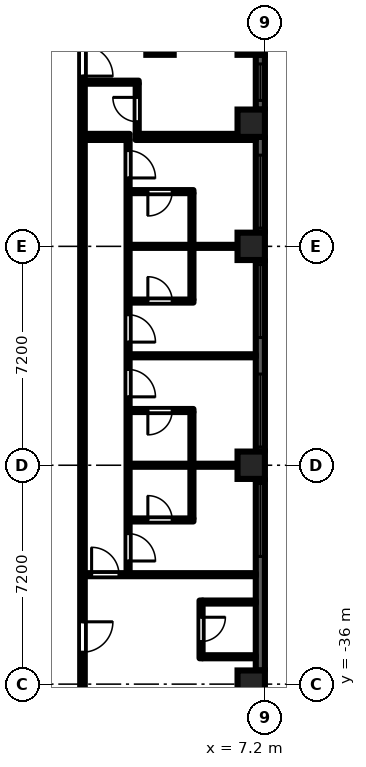
"""IFC4 building model, lengths in metres.
Left out: names, types, materials, properties, quantities, classifications, styles, units other than length and angle.
Written with IfcOpenShell. Run it as: python <this file> out.ifc"""

import sys

from ifc_helpers import new_model, si_unit, direction, frame, frame_2d, origin, origin_2d, place, context, subcontext, project, spatial, rectangle, extrude, element, fill, save


model = new_model("IFC4")
c1 = context("Model", 3, precision=1e-05, world=origin(), true_north=direction((0.0, 1.0)))
c2 = subcontext(c1, "Body", "Model", "MODEL_VIEW")
j1 = project(units=[si_unit("LENGTHUNIT", "METRE"), si_unit("PLANEANGLEUNIT", "RADIAN")], contexts=[c1])
p1 = place(None, origin())
s1 = spatial("IfcSite", under=j1, at=p1, CompositionType="ELEMENT")
p2 = place(p1, origin())
s2 = spatial("IfcBuilding", under=s1, at=p2, CompositionType="ELEMENT")
p3 = place(p2, frame((0.0, 0.0, 29.7)))
s3 = spatial("IfcBuildingStorey", under=s2, at=p3, CompositionType="ELEMENT", Elevation=29.7)
for number, where, z_axis, x_axis in (
    (1, (3.75, -14.85, 0.0), (0.0, 0.0, 1.0), (1.0, 0.0, 0.0)),
    (2, (6.75, -36.0, 0.0), (0.0, 0.0, 1.0), (1.0, 0.0, 0.0)),
    (3, (6.75, -28.8, 0.0), (0.0, 0.0, 1.0), (1.0, 0.0, 0.0)),
    (4, (6.75, -21.6, 0.0), (0.0, 0.0, 1.0), (1.0, 0.0, 0.0)),
    (5, (6.75, -17.55, 0.0), (0.0, 0.0, 1.0), (1.0, 0.0, 0.0)),
    (6, (6.75, -14.85, 0.0), (0.0, 0.0, 1.0), (1.0, 0.0, 0.0)),
):
    element("IfcColumn", number, at=place(p3, frame(where, z_axis=z_axis, x_axis=x_axis)), inside=s3, PredefinedType="COLUMN", context=c2, shape_type="SweptSolid", body=[
        extrude(rectangle(XDim=0.9, YDim=0.9, at=origin_2d()), origin(), (0.0, 0.0, 1.0), 3.0),
    ])
p4 = place(p3, frame((7.05, -35.55, 0.0), z_axis=(0.0, 0.0, 1.0), x_axis=(0.0, 1.0, 0.0)))
e7 = element("IfcWall", 7, at=p4, inside=s3, PredefinedType="SOLIDWALL", context=c2, shape_type="SweptSolid", body=[
    extrude(rectangle(XDim=6.3, YDim=0.3, at=frame_2d((3.15, 0.0))), origin(), (0.0, 0.0, 1.0), 2.1),
])
p5 = place(p4, frame((3.75, 0.0, 0.2)))
e8 = element("IfcOpeningElement", 8, at=p5, cuts=e7, PredefinedType="OPENING", context=c2, shape_type="SweptSolid", body=[
    extrude(rectangle(XDim=2.4, YDim=1.85, at=frame_2d((1.2, 0.925))), frame((0.0, 0.16, 0.0), z_axis=(0.0, -1.0, 0.0), x_axis=(1.0, 0.0, 0.0)), (0.0, 0.0, 1.0), 0.32),
])
p6 = place(p3, frame((7.05, -28.35, 0.0), z_axis=(0.0, 0.0, 1.0), x_axis=(0.0, 1.0, 0.0)))
e9 = element("IfcWall", 9, at=p6, inside=s3, PredefinedType="SOLIDWALL", context=c2, shape_type="SweptSolid", body=[
    extrude(rectangle(XDim=6.3, YDim=0.3, at=frame_2d((3.15, 0.0))), origin(), (0.0, 0.0, 1.0), 2.1),
])
p7 = place(p6, frame((0.15, 0.0, 0.2)))
e10 = element("IfcOpeningElement", 10, at=p7, cuts=e9, PredefinedType="OPENING", context=c2, shape_type="SweptSolid", body=[
    extrude(rectangle(XDim=2.4, YDim=1.85, at=frame_2d((1.2, 0.925))), frame((0.0, 0.16, 0.0), z_axis=(0.0, -1.0, 0.0), x_axis=(1.0, 0.0, 0.0)), (0.0, 0.0, 1.0), 0.32),
])
p8 = place(p6, frame((3.75, 0.0, 0.2)))
e11 = element("IfcOpeningElement", 11, at=p8, cuts=e9, PredefinedType="OPENING", context=c2, shape_type="SweptSolid", body=[
    extrude(rectangle(XDim=2.4, YDim=1.85, at=frame_2d((1.2, 0.925))), frame((0.0, 0.16, 0.0), z_axis=(0.0, -1.0, 0.0), x_axis=(1.0, 0.0, 0.0)), (0.0, 0.0, 1.0), 0.32),
])
p9 = place(p3, frame((7.05, -21.15, 0.0), z_axis=(0.0, 0.0, 1.0), x_axis=(0.0, 1.0, 0.0)))
e12 = element("IfcWall", 12, at=p9, inside=s3, PredefinedType="SOLIDWALL", context=c2, shape_type="SweptSolid", body=[
    extrude(rectangle(XDim=3.15, YDim=0.3, at=frame_2d((1.575, 0.0))), origin(), (0.0, 0.0, 1.0), 2.1),
])
p10 = place(p9, frame((0.15, 0.0, 0.2)))
e13 = element("IfcOpeningElement", 13, at=p10, cuts=e12, PredefinedType="OPENING", context=c2, shape_type="SweptSolid", body=[
    extrude(rectangle(XDim=2.4, YDim=1.85, at=frame_2d((1.2, 0.925))), frame((0.0, 0.16, 0.0), z_axis=(0.0, -1.0, 0.0), x_axis=(1.0, 0.0, 0.0)), (0.0, 0.0, 1.0), 0.32),
])
p11 = place(p3, frame((7.05, -17.1, 0.0), z_axis=(0.0, 0.0, 1.0), x_axis=(0.0, 1.0, 0.0)))
e14 = element("IfcWall", 14, at=p11, inside=s3, PredefinedType="SOLIDWALL", context=c2, shape_type="SweptSolid", body=[
    extrude(rectangle(XDim=1.8, YDim=0.3, at=frame_2d((0.9, 0.0))), origin(), (0.0, 0.0, 1.0), 2.1),
])
p12 = place(p11, frame((0.3, 0.0, 0.2)))
e15 = element("IfcOpeningElement", 15, at=p12, cuts=e14, PredefinedType="OPENING", context=c2, shape_type="SweptSolid", body=[
    extrude(rectangle(XDim=1.2, YDim=1.85, at=frame_2d((0.6, 0.925))), frame((0.0, 0.16, 0.0), z_axis=(0.0, -1.0, 0.0), x_axis=(1.0, 0.0, 0.0)), (0.0, 0.0, 1.0), 0.32),
])
p13 = place(p3, frame((1.2, -36.5, 0.0), z_axis=(0.0, 0.0, 1.0), x_axis=(0.0, 1.0, 0.0)))
e16 = element("IfcWall", 16, at=p13, inside=s3, PredefinedType="PARTITIONING", context=c2, shape_type="SweptSolid", body=[
    extrude(rectangle(XDim=35.375, YDim=0.15, at=frame_2d((17.688, 0.0))), origin(), (0.0, 0.0, 1.0), 2.575),
])
p14 = place(p13, frame((31.85, 0.0, 0.0)))
e17 = element("IfcOpeningElement", 17, at=p14, cuts=e16, PredefinedType="OPENING", context=c2, shape_type="SweptSolid", body=[
    extrude(rectangle(XDim=0.9, YDim=2.1, at=frame_2d((0.45, 1.05))), frame((0.0, 0.085, 0.0), z_axis=(0.0, -1.0, 0.0), x_axis=(1.0, 0.0, 0.0)), (0.0, 0.0, 1.0), 0.17),
])
p15 = place(p13, frame((23.45, 0.0, 0.0)))
e18 = element("IfcOpeningElement", 18, at=p15, cuts=e16, PredefinedType="OPENING", context=c2, shape_type="SweptSolid", body=[
    extrude(rectangle(XDim=0.9, YDim=2.1, at=frame_2d((0.45, 1.05))), frame((0.0, 0.085, 0.0), z_axis=(0.0, -1.0, 0.0), x_axis=(1.0, 0.0, 0.0)), (0.0, 0.0, 1.0), 0.17),
])
p16 = place(p13, frame((20.5, 0.0, 0.0)))
e19 = element("IfcOpeningElement", 19, at=p16, cuts=e16, PredefinedType="OPENING", context=c2, shape_type="SweptSolid", body=[
    extrude(rectangle(XDim=1.0, YDim=2.1, at=frame_2d((0.5, 1.05))), frame((0.0, 0.085, 0.0), z_axis=(0.0, -1.0, 0.0), x_axis=(1.0, 0.0, 0.0)), (0.0, 0.0, 1.0), 0.17),
])
p17 = place(p13, frame((1.55, 0.0, 0.0)))
e20 = element("IfcOpeningElement", 20, at=p17, cuts=e16, PredefinedType="OPENING", context=c2, shape_type="SweptSolid", body=[
    extrude(rectangle(XDim=1.0, YDim=2.1, at=frame_2d((0.5, 1.05))), frame((0.0, 0.085, 0.0), z_axis=(0.0, -1.0, 0.0), x_axis=(1.0, 0.0, 0.0)), (0.0, 0.0, 1.0), 0.17),
])
p18 = place(p3, frame((1.275, -32.4, 0.0), z_axis=(0.0, 0.0, 1.0), x_axis=(1.0, 0.0, 0.0)))
e21 = element("IfcWall", 21, at=p18, inside=s3, PredefinedType="PARTITIONING", context=c2, shape_type="SweptSolid", body=[
    extrude(rectangle(XDim=5.625, YDim=0.1, at=frame_2d((2.812, 0.0))), origin(), (0.0, 0.0, 1.0), 2.575),
])
p19 = place(p18, frame((0.225, 0.0, 0.0)))
e22 = element("IfcOpeningElement", 22, at=p19, cuts=e21, PredefinedType="OPENING", context=c2, shape_type="SweptSolid", body=[
    extrude(rectangle(XDim=0.9, YDim=2.1, at=frame_2d((0.45, 1.05))), frame((0.0, 0.06, 0.0), z_axis=(0.0, -1.0, 0.0), x_axis=(1.0, 0.0, 0.0)), (0.0, 0.0, 1.0), 0.12),
])
p20 = place(p3, frame((1.275, -18.0, 0.0), z_axis=(0.0, 0.0, 1.0), x_axis=(1.0, 0.0, 0.0)))
e23 = element("IfcWall", 23, at=p20, inside=s3, PredefinedType="PARTITIONING", context=c2, shape_type="SweptSolid", body=[
    extrude(rectangle(XDim=1.475, YDim=0.2, at=frame_2d((0.738, 0.0))), origin(), (0.0, 0.0, 1.0), 2.575),
])
p21 = place(p3, frame((1.275, -16.2, 0.0), z_axis=(0.0, 0.0, 1.0), x_axis=(1.0, 0.0, 0.0)))
e24 = element("IfcWall", 24, at=p21, inside=s3, PredefinedType="PARTITIONING", context=c2, shape_type="SweptSolid", body=[
    extrude(rectangle(XDim=1.775, YDim=0.1, at=frame_2d((0.888, 0.0))), origin(), (0.0, 0.0, 1.0), 2.575),
])
p22 = place(p3, frame((2.7, -32.35, 0.0), z_axis=(0.0, 0.0, 1.0), x_axis=(0.0, 1.0, 0.0)))
e25 = element("IfcWall", 25, at=p22, inside=s3, PredefinedType="PARTITIONING", context=c2, shape_type="SweptSolid", body=[
    extrude(rectangle(XDim=14.25, YDim=0.1, at=frame_2d((7.125, 0.0))), origin(), (0.0, 0.0, 1.0), 2.575),
])
p23 = place(p22, frame((0.4, 0.0, 0.0)))
e26 = element("IfcOpeningElement", 26, at=p23, cuts=e25, PredefinedType="OPENING", context=c2, shape_type="SweptSolid", body=[
    extrude(rectangle(XDim=0.9, YDim=2.1, at=frame_2d((0.45, 1.05))), frame((0.0, 0.06, 0.0), z_axis=(0.0, -1.0, 0.0), x_axis=(1.0, 0.0, 0.0)), (0.0, 0.0, 1.0), 0.12),
])
p24 = place(p22, frame((5.8, 0.0, 0.0)))
e27 = element("IfcOpeningElement", 27, at=p24, cuts=e25, PredefinedType="OPENING", context=c2, shape_type="SweptSolid", body=[
    extrude(rectangle(XDim=0.9, YDim=2.1, at=frame_2d((0.45, 1.05))), frame((0.0, 0.06, 0.0), z_axis=(0.0, -1.0, 0.0), x_axis=(1.0, 0.0, 0.0)), (0.0, 0.0, 1.0), 0.12),
])
p25 = place(p22, frame((7.6, 0.0, 0.0)))
e28 = element("IfcOpeningElement", 28, at=p25, cuts=e25, PredefinedType="OPENING", context=c2, shape_type="SweptSolid", body=[
    extrude(rectangle(XDim=0.9, YDim=2.1, at=frame_2d((0.45, 1.05))), frame((0.0, 0.06, 0.0), z_axis=(0.0, -1.0, 0.0), x_axis=(1.0, 0.0, 0.0)), (0.0, 0.0, 1.0), 0.12),
])
p26 = place(p22, frame((13.0, 0.0, 0.0)))
e29 = element("IfcOpeningElement", 29, at=p26, cuts=e25, PredefinedType="OPENING", context=c2, shape_type="SweptSolid", body=[
    extrude(rectangle(XDim=0.9, YDim=2.1, at=frame_2d((0.45, 1.05))), frame((0.0, 0.06, 0.0), z_axis=(0.0, -1.0, 0.0), x_axis=(1.0, 0.0, 0.0)), (0.0, 0.0, 1.0), 0.12),
])
p27 = place(p3, frame((2.75, -30.6, 0.0), z_axis=(0.0, 0.0, 1.0), x_axis=(1.0, 0.0, 0.0)))
e30 = element("IfcWall", 30, at=p27, inside=s3, PredefinedType="PARTITIONING", context=c2, shape_type="SweptSolid", body=[
    extrude(rectangle(XDim=2.1, YDim=0.1, at=frame_2d((1.05, 0.0))), origin(), (0.0, 0.0, 1.0), 2.575),
])
p28 = place(p27, frame((0.6, 0.0, 0.0)))
e31 = element("IfcOpeningElement", 31, at=p28, cuts=e30, PredefinedType="OPENING", context=c2, shape_type="SweptSolid", body=[
    extrude(rectangle(XDim=0.8, YDim=2.1, at=frame_2d((0.4, 1.05))), frame((0.0, 0.06, 0.0), z_axis=(0.0, -1.0, 0.0), x_axis=(1.0, 0.0, 0.0)), (0.0, 0.0, 1.0), 0.12),
])
p29 = place(p3, frame((2.75, -28.8, 0.0), z_axis=(0.0, 0.0, 1.0), x_axis=(1.0, 0.0, 0.0)))
e32 = element("IfcWall", 32, at=p29, inside=s3, PredefinedType="PARTITIONING", context=c2, shape_type="SweptSolid", body=[
    extrude(rectangle(XDim=4.15, YDim=0.1, at=frame_2d((2.075, 0.0))), origin(), (0.0, 0.0, 1.0), 2.575),
])
p30 = place(p3, frame((2.75, -27.0, 0.0), z_axis=(0.0, 0.0, 1.0), x_axis=(1.0, 0.0, 0.0)))
e33 = element("IfcWall", 33, at=p30, inside=s3, PredefinedType="PARTITIONING", context=c2, shape_type="SweptSolid", body=[
    extrude(rectangle(XDim=2.1, YDim=0.1, at=frame_2d((1.05, 0.0))), origin(), (0.0, 0.0, 1.0), 2.575),
])
p31 = place(p30, frame((0.6, 0.0, 0.0)))
e34 = element("IfcOpeningElement", 34, at=p31, cuts=e33, PredefinedType="OPENING", context=c2, shape_type="SweptSolid", body=[
    extrude(rectangle(XDim=0.8, YDim=2.1, at=frame_2d((0.4, 1.05))), frame((0.0, 0.06, 0.0), z_axis=(0.0, -1.0, 0.0), x_axis=(1.0, 0.0, 0.0)), (0.0, 0.0, 1.0), 0.12),
])
p32 = place(p3, frame((2.75, -25.2, 0.0), z_axis=(0.0, 0.0, 1.0), x_axis=(1.0, 0.0, 0.0)))
e35 = element("IfcWall", 35, at=p32, inside=s3, PredefinedType="PARTITIONING", context=c2, shape_type="SweptSolid", body=[
    extrude(rectangle(XDim=4.15, YDim=0.1, at=frame_2d((2.075, 0.0))), origin(), (0.0, 0.0, 1.0), 2.575),
])
p33 = place(p3, frame((2.75, -23.4, 0.0), z_axis=(0.0, 0.0, 1.0), x_axis=(1.0, 0.0, 0.0)))
e36 = element("IfcWall", 36, at=p33, inside=s3, PredefinedType="PARTITIONING", context=c2, shape_type="SweptSolid", body=[
    extrude(rectangle(XDim=2.1, YDim=0.1, at=frame_2d((1.05, 0.0))), origin(), (0.0, 0.0, 1.0), 2.575),
])
p34 = place(p33, frame((0.6, 0.0, 0.0)))
e37 = element("IfcOpeningElement", 37, at=p34, cuts=e36, PredefinedType="OPENING", context=c2, shape_type="SweptSolid", body=[
    extrude(rectangle(XDim=0.8, YDim=2.1, at=frame_2d((0.4, 1.05))), frame((0.0, 0.06, 0.0), z_axis=(0.0, -1.0, 0.0), x_axis=(1.0, 0.0, 0.0)), (0.0, 0.0, 1.0), 0.12),
])
p35 = place(p3, frame((2.75, -21.6, 0.0), z_axis=(0.0, 0.0, 1.0), x_axis=(1.0, 0.0, 0.0)))
e38 = element("IfcWall", 38, at=p35, inside=s3, PredefinedType="PARTITIONING", context=c2, shape_type="SweptSolid", body=[
    extrude(rectangle(XDim=4.15, YDim=0.1, at=frame_2d((2.075, 0.0))), origin(), (0.0, 0.0, 1.0), 2.575),
])
p36 = place(p3, frame((2.75, -19.8, 0.0), z_axis=(0.0, 0.0, 1.0), x_axis=(1.0, 0.0, 0.0)))
e39 = element("IfcWall", 39, at=p36, inside=s3, PredefinedType="PARTITIONING", context=c2, shape_type="SweptSolid", body=[
    extrude(rectangle(XDim=2.1, YDim=0.1, at=frame_2d((1.05, 0.0))), origin(), (0.0, 0.0, 1.0), 2.575),
])
p37 = place(p36, frame((0.6, 0.0, 0.0)))
e40 = element("IfcOpeningElement", 40, at=p37, cuts=e39, PredefinedType="OPENING", context=c2, shape_type="SweptSolid", body=[
    extrude(rectangle(XDim=0.8, YDim=2.1, at=frame_2d((0.4, 1.05))), frame((0.0, 0.06, 0.0), z_axis=(0.0, -1.0, 0.0), x_axis=(1.0, 0.0, 0.0)), (0.0, 0.0, 1.0), 0.12),
])
p38 = place(p3, frame((3.0, -17.9, 0.0), z_axis=(0.0, 0.0, 1.0), x_axis=(0.0, 1.0, 0.0)))
e41 = element("IfcWall", 41, at=p38, inside=s3, PredefinedType="PARTITIONING", context=c2, shape_type="SweptSolid", body=[
    extrude(rectangle(XDim=1.65, YDim=0.1, at=frame_2d((0.825, 0.0))), origin(), (0.0, 0.0, 1.0), 2.575),
])
p39 = place(p38, frame((0.4, 0.0, 0.0)))
e42 = element("IfcOpeningElement", 42, at=p39, cuts=e41, PredefinedType="OPENING", context=c2, shape_type="SweptSolid", body=[
    extrude(rectangle(XDim=0.8, YDim=2.1, at=frame_2d((0.4, 1.05))), frame((0.0, 0.06, 0.0), z_axis=(0.0, -1.0, 0.0), x_axis=(1.0, 0.0, 0.0)), (0.0, 0.0, 1.0), 0.12),
])
p40 = place(p3, frame((2.95, -18.0, 0.0), z_axis=(0.0, 0.0, 1.0), x_axis=(1.0, 0.0, 0.0)))
e43 = element("IfcWall", 43, at=p40, inside=s3, PredefinedType="PARTITIONING", context=c2, shape_type="SweptSolid", body=[
    extrude(rectangle(XDim=3.95, YDim=0.2, at=frame_2d((1.975, 0.0))), origin(), (0.0, 0.0, 1.0), 2.575),
])
for number, where, z_axis, x_axis in (
    (44, (4.8, -30.55, 0.0), (0.0, 0.0, 1.0), (0.0, 1.0, 0.0)),
    (45, (4.8, -23.35, 0.0), (0.0, 0.0, 1.0), (0.0, 1.0, 0.0)),
):
    element("IfcWall", number, at=place(p3, frame(where, z_axis=z_axis, x_axis=x_axis)), inside=s3, PredefinedType="PARTITIONING", context=c2, shape_type="SweptSolid", body=[
        extrude(rectangle(XDim=3.5, YDim=0.1, at=frame_2d((1.75, 0.0))), origin(), (0.0, 0.0, 1.0), 2.575),
    ])
p41 = place(p3, frame((5.1, -35.15, 0.0), z_axis=(0.0, 0.0, 1.0), x_axis=(0.0, 1.0, 0.0)))
e46 = element("IfcWall", 46, at=p41, inside=s3, PredefinedType="PARTITIONING", context=c2, shape_type="SweptSolid", body=[
    extrude(rectangle(XDim=1.9, YDim=0.1, at=frame_2d((0.95, 0.0))), origin(), (0.0, 0.0, 1.0), 2.575),
])
p42 = place(p41, frame((0.55, 0.0, 0.0)))
e47 = element("IfcOpeningElement", 47, at=p42, cuts=e46, PredefinedType="OPENING", context=c2, shape_type="SweptSolid", body=[
    extrude(rectangle(XDim=0.8, YDim=2.1, at=frame_2d((0.4, 1.05))), frame((0.0, 0.06, 0.0), z_axis=(0.0, -1.0, 0.0), x_axis=(1.0, 0.0, 0.0)), (0.0, 0.0, 1.0), 0.12),
])
for number, where, z_axis, x_axis in (
    (48, (5.15, -35.1, 0.0), (0.0, 0.0, 1.0), (1.0, 0.0, 0.0)),
    (49, (5.15, -33.3, 0.0), (0.0, 0.0, 1.0), (1.0, 0.0, 0.0)),
):
    element("IfcWall", number, at=place(p3, frame(where, z_axis=z_axis, x_axis=x_axis)), inside=s3, PredefinedType="PARTITIONING", context=c2, shape_type="SweptSolid", body=[
        extrude(rectangle(XDim=1.75, YDim=0.1, at=frame_2d((0.875, 0.0))), origin(), (0.0, 0.0, 1.0), 2.575),
    ])
p43 = place(p5, origin())
e50 = element("IfcWindow", 50, at=p43, inside=s3, PartitioningType="SINGLE_PANEL", PredefinedType="WINDOW", context=c2, shape_type="SweptSolid", body=[
    extrude(rectangle(XDim=2.4, YDim=1.85, at=frame_2d((1.2, 0.925))), frame((0.0, 0.03, 0.0), z_axis=(0.0, -1.0, 0.0), x_axis=(1.0, 0.0, 0.0)), (0.0, 0.0, 1.0), 0.06),
])
fill(e8, e50)
p44 = place(p7, origin())
e51 = element("IfcWindow", 51, at=p44, inside=s3, PartitioningType="SINGLE_PANEL", PredefinedType="WINDOW", context=c2, shape_type="SweptSolid", body=[
    extrude(rectangle(XDim=2.4, YDim=1.85, at=frame_2d((1.2, 0.925))), frame((0.0, 0.03, 0.0), z_axis=(0.0, -1.0, 0.0), x_axis=(1.0, 0.0, 0.0)), (0.0, 0.0, 1.0), 0.06),
])
fill(e10, e51)
p45 = place(p8, origin())
e52 = element("IfcWindow", 52, at=p45, inside=s3, PartitioningType="SINGLE_PANEL", PredefinedType="WINDOW", context=c2, shape_type="SweptSolid", body=[
    extrude(rectangle(XDim=2.4, YDim=1.85, at=frame_2d((1.2, 0.925))), frame((0.0, 0.03, 0.0), z_axis=(0.0, -1.0, 0.0), x_axis=(1.0, 0.0, 0.0)), (0.0, 0.0, 1.0), 0.06),
])
fill(e11, e52)
p46 = place(p10, origin())
e53 = element("IfcWindow", 53, at=p46, inside=s3, PartitioningType="SINGLE_PANEL", PredefinedType="WINDOW", context=c2, shape_type="SweptSolid", body=[
    extrude(rectangle(XDim=2.4, YDim=1.85, at=frame_2d((1.2, 0.925))), frame((0.0, 0.03, 0.0), z_axis=(0.0, -1.0, 0.0), x_axis=(1.0, 0.0, 0.0)), (0.0, 0.0, 1.0), 0.06),
])
fill(e13, e53)
p47 = place(p12, origin())
e54 = element("IfcWindow", 54, at=p47, inside=s3, PartitioningType="SINGLE_PANEL", PredefinedType="WINDOW", context=c2, shape_type="SweptSolid", body=[
    extrude(rectangle(XDim=1.2, YDim=1.85, at=frame_2d((0.6, 0.925))), frame((0.0, 0.03, 0.0), z_axis=(0.0, -1.0, 0.0), x_axis=(1.0, 0.0, 0.0)), (0.0, 0.0, 1.0), 0.06),
])
fill(e15, e54)
p48 = place(p39, origin())
e55 = element("IfcDoor", 55, at=p48, inside=s3, OperationType="SINGLE_SWING_RIGHT", PredefinedType="DOOR", context=c2, shape_type="SweptSolid", body=[
    extrude(rectangle(XDim=0.8, YDim=2.1, at=frame_2d((0.4, 1.05))), frame((0.0, 0.025, 0.0), z_axis=(0.0, -1.0, 0.0), x_axis=(1.0, 0.0, 0.0)), (0.0, 0.0, 1.0), 0.05),
])
fill(e42, e55)
p49 = place(p16, frame((1.0, 0.0, 0.0), z_axis=(0.0, 0.0, 1.0), x_axis=(-1.0, 0.0, 0.0)))
e56 = element("IfcDoor", 56, at=p49, inside=s3, OperationType="SINGLE_SWING_RIGHT", PredefinedType="DOOR", context=c2, shape_type="SweptSolid", body=[
    extrude(rectangle(XDim=1.0, YDim=2.1, at=frame_2d((0.5, 1.05))), frame((0.0, 0.025, 0.0), z_axis=(0.0, -1.0, 0.0), x_axis=(1.0, 0.0, 0.0)), (0.0, 0.0, 1.0), 0.05),
])
fill(e19, e56)
p50 = place(p42, frame((0.8, 0.0, 0.0), z_axis=(0.0, 0.0, 1.0), x_axis=(-1.0, 0.0, 0.0)))
e57 = element("IfcDoor", 57, at=p50, inside=s3, OperationType="SINGLE_SWING_LEFT", PredefinedType="DOOR", context=c2, shape_type="SweptSolid", body=[
    extrude(rectangle(XDim=0.8, YDim=2.1, at=frame_2d((0.4, 1.05))), frame((0.0, 0.025, 0.0), z_axis=(0.0, -1.0, 0.0), x_axis=(1.0, 0.0, 0.0)), (0.0, 0.0, 1.0), 0.05),
])
fill(e47, e57)
p51 = place(p17, frame((1.0, 0.0, 0.0), z_axis=(0.0, 0.0, 1.0), x_axis=(-1.0, 0.0, 0.0)))
e58 = element("IfcDoor", 58, at=p51, inside=s3, OperationType="SINGLE_SWING_LEFT", PredefinedType="DOOR", context=c2, shape_type="SweptSolid", body=[
    extrude(rectangle(XDim=1.0, YDim=2.1, at=frame_2d((0.5, 1.05))), frame((0.0, 0.025, 0.0), z_axis=(0.0, -1.0, 0.0), x_axis=(1.0, 0.0, 0.0)), (0.0, 0.0, 1.0), 0.05),
])
fill(e20, e58)
p52 = place(p19, origin())
e59 = element("IfcDoor", 59, at=p52, inside=s3, OperationType="SINGLE_SWING_LEFT", PredefinedType="DOOR", context=c2, shape_type="SweptSolid", body=[
    extrude(rectangle(XDim=0.9, YDim=2.1, at=frame_2d((0.45, 1.05))), frame((0.0, 0.025, 0.0), z_axis=(0.0, -1.0, 0.0), x_axis=(1.0, 0.0, 0.0)), (0.0, 0.0, 1.0), 0.05),
])
fill(e22, e59)
p53 = place(p23, frame((0.9, 0.0, 0.0), z_axis=(0.0, 0.0, 1.0), x_axis=(-1.0, 0.0, 0.0)))
e60 = element("IfcDoor", 60, at=p53, inside=s3, OperationType="SINGLE_SWING_RIGHT", PredefinedType="DOOR", context=c2, shape_type="SweptSolid", body=[
    extrude(rectangle(XDim=0.9, YDim=2.1, at=frame_2d((0.45, 1.05))), frame((0.0, 0.025, 0.0), z_axis=(0.0, -1.0, 0.0), x_axis=(1.0, 0.0, 0.0)), (0.0, 0.0, 1.0), 0.05),
])
fill(e26, e60)
p54 = place(p24, frame((0.9, 0.0, 0.0), z_axis=(0.0, 0.0, 1.0), x_axis=(-1.0, 0.0, 0.0)))
e61 = element("IfcDoor", 61, at=p54, inside=s3, OperationType="SINGLE_SWING_RIGHT", PredefinedType="DOOR", context=c2, shape_type="SweptSolid", body=[
    extrude(rectangle(XDim=0.9, YDim=2.1, at=frame_2d((0.45, 1.05))), frame((0.0, 0.025, 0.0), z_axis=(0.0, -1.0, 0.0), x_axis=(1.0, 0.0, 0.0)), (0.0, 0.0, 1.0), 0.05),
])
fill(e27, e61)
p55 = place(p25, frame((0.9, 0.0, 0.0), z_axis=(0.0, 0.0, 1.0), x_axis=(-1.0, 0.0, 0.0)))
e62 = element("IfcDoor", 62, at=p55, inside=s3, OperationType="SINGLE_SWING_RIGHT", PredefinedType="DOOR", context=c2, shape_type="SweptSolid", body=[
    extrude(rectangle(XDim=0.9, YDim=2.1, at=frame_2d((0.45, 1.05))), frame((0.0, 0.025, 0.0), z_axis=(0.0, -1.0, 0.0), x_axis=(1.0, 0.0, 0.0)), (0.0, 0.0, 1.0), 0.05),
])
fill(e28, e62)
p56 = place(p26, frame((0.9, 0.0, 0.0), z_axis=(0.0, 0.0, 1.0), x_axis=(-1.0, 0.0, 0.0)))
e63 = element("IfcDoor", 63, at=p56, inside=s3, OperationType="SINGLE_SWING_RIGHT", PredefinedType="DOOR", context=c2, shape_type="SweptSolid", body=[
    extrude(rectangle(XDim=0.9, YDim=2.1, at=frame_2d((0.45, 1.05))), frame((0.0, 0.025, 0.0), z_axis=(0.0, -1.0, 0.0), x_axis=(1.0, 0.0, 0.0)), (0.0, 0.0, 1.0), 0.05),
])
fill(e29, e63)
p57 = place(p37, frame((0.8, 0.0, 0.0), z_axis=(0.0, 0.0, 1.0), x_axis=(-1.0, 0.0, 0.0)))
e64 = element("IfcDoor", 64, at=p57, inside=s3, OperationType="SINGLE_SWING_RIGHT", PredefinedType="DOOR", context=c2, shape_type="SweptSolid", body=[
    extrude(rectangle(XDim=0.8, YDim=2.1, at=frame_2d((0.4, 1.05))), frame((0.0, 0.025, 0.0), z_axis=(0.0, -1.0, 0.0), x_axis=(1.0, 0.0, 0.0)), (0.0, 0.0, 1.0), 0.05),
])
fill(e40, e64)
p58 = place(p34, origin())
e65 = element("IfcDoor", 65, at=p58, inside=s3, OperationType="SINGLE_SWING_LEFT", PredefinedType="DOOR", context=c2, shape_type="SweptSolid", body=[
    extrude(rectangle(XDim=0.8, YDim=2.1, at=frame_2d((0.4, 1.05))), frame((0.0, 0.025, 0.0), z_axis=(0.0, -1.0, 0.0), x_axis=(1.0, 0.0, 0.0)), (0.0, 0.0, 1.0), 0.05),
])
fill(e37, e65)
p59 = place(p31, frame((0.8, 0.0, 0.0), z_axis=(0.0, 0.0, 1.0), x_axis=(-1.0, 0.0, 0.0)))
e66 = element("IfcDoor", 66, at=p59, inside=s3, OperationType="SINGLE_SWING_RIGHT", PredefinedType="DOOR", context=c2, shape_type="SweptSolid", body=[
    extrude(rectangle(XDim=0.8, YDim=2.1, at=frame_2d((0.4, 1.05))), frame((0.0, 0.025, 0.0), z_axis=(0.0, -1.0, 0.0), x_axis=(1.0, 0.0, 0.0)), (0.0, 0.0, 1.0), 0.05),
])
fill(e34, e66)
p60 = place(p28, origin())
e67 = element("IfcDoor", 67, at=p60, inside=s3, OperationType="SINGLE_SWING_LEFT", PredefinedType="DOOR", context=c2, shape_type="SweptSolid", body=[
    extrude(rectangle(XDim=0.8, YDim=2.1, at=frame_2d((0.4, 1.05))), frame((0.0, 0.025, 0.0), z_axis=(0.0, -1.0, 0.0), x_axis=(1.0, 0.0, 0.0)), (0.0, 0.0, 1.0), 0.05),
])
fill(e31, e67)
save(model, sys.argv[1])
